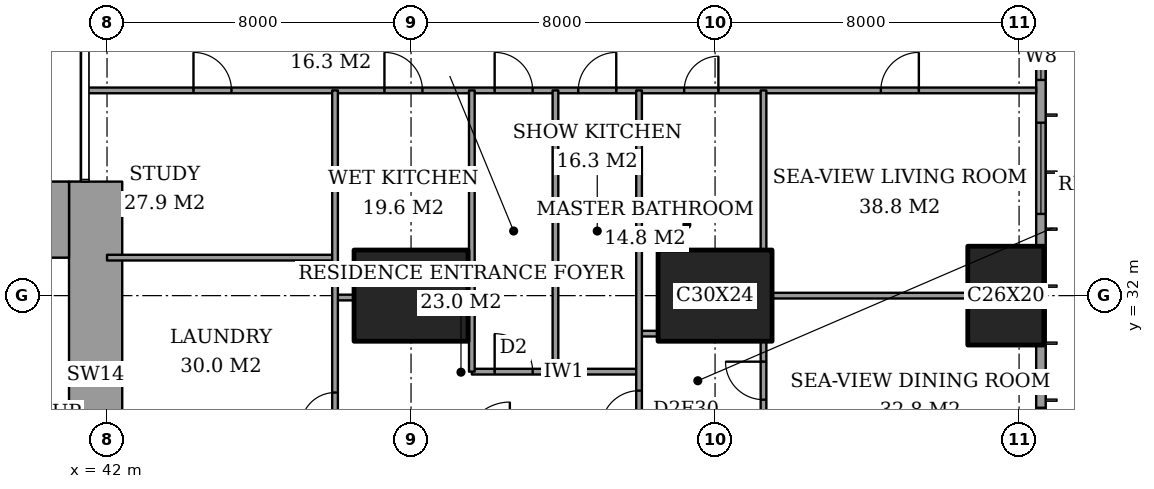
"""IFC4 building model, lengths in metres.
Left out: names, types, materials, properties, quantities, classifications, styles, units other than length and angle.
Written with IfcOpenShell. Run it as: python <this file> out.ifc"""

import sys

from ifc_helpers import new_model, si_unit, direction, frame, frame_2d, origin, origin_2d, place, context, subcontext, project, spatial, rectangle, extrude, element, fill, save


model = new_model("IFC4")
c1 = context("Model", 3, precision=1e-05, world=origin(), true_north=direction((0.0, 1.0)))
c2 = subcontext(c1, "Body", "Model", "MODEL_VIEW")
j1 = project(units=[si_unit("LENGTHUNIT", "METRE"), si_unit("PLANEANGLEUNIT", "RADIAN")], contexts=[c1])
p1 = place(None, origin())
s1 = spatial("IfcSite", under=j1, at=p1, CompositionType="ELEMENT")
p2 = place(p1, origin())
s2 = spatial("IfcBuilding", under=s1, at=p2, CompositionType="ELEMENT")
p3 = place(p2, frame((0.0, 0.0, 44.0)))
s3 = spatial("IfcBuildingStorey", under=s2, at=p3, CompositionType="ELEMENT", Elevation=44.0)
for number, where, z_axis, x_axis in (
    (1, (50.0, 32.0, 0.0), (0.0, 0.0, 1.0), (1.0, 0.0, 0.0)),
    (2, (58.0, 32.0, 0.0), (0.0, 0.0, 1.0), (1.0, 0.0, 0.0)),
):
    element("IfcColumn", number, at=place(p3, frame(where, z_axis=z_axis, x_axis=x_axis)), inside=s3, PredefinedType="COLUMN", context=c2, shape_type="SweptSolid", body=[
        extrude(rectangle(XDim=3.0, YDim=2.4, at=origin_2d()), origin(), (0.0, 0.0, 1.0), 3.6),
    ])
p4 = place(p3, frame((65.65, 32.0, 0.0), z_axis=(0.0, 0.0, 1.0), x_axis=(0.0, 1.0, 0.0)))
e3 = element("IfcColumn", 3, at=p4, inside=s3, PredefinedType="COLUMN", context=c2, shape_type="SweptSolid", body=[
    extrude(rectangle(XDim=2.6, YDim=2.0, at=origin_2d()), origin(), (0.0, 0.0, 1.0), 3.6),
])
p5 = place(p3, frame((37.85, 34.0, 0.0), z_axis=(0.0, 0.0, 1.0), x_axis=(1.0, 0.0, 0.0)))
e4 = element("IfcWall", 4, at=p5, inside=s3, PredefinedType="SHEAR", context=c2, shape_type="SweptSolid", body=[
    extrude(rectangle(XDim=3.15, YDim=2.0, at=frame_2d((1.575, 0.0))), origin(), (0.0, 0.0, 1.0), 3.6),
])
p6 = place(p3, frame((41.7, 24.85, 0.0), z_axis=(0.0, 0.0, 1.0), x_axis=(0.0, 1.0, 0.0)))
e5 = element("IfcWall", 5, at=p6, inside=s3, PredefinedType="SHEAR", context=c2, shape_type="SweptSolid", body=[
    extrude(rectangle(XDim=10.15, YDim=1.4, at=frame_2d((5.075, 0.0))), origin(), (0.0, 0.0, 1.0), 3.6),
])
p7 = place(p3, frame((66.575, 3.175, 0.0), z_axis=(0.0, 0.0, 1.0), x_axis=(0.0, 1.0, 0.0)))
e6 = element("IfcWall", 6, at=p7, inside=s3, PredefinedType="SOLIDWALL", context=c2, shape_type="SweptSolid", body=[
    extrude(rectangle(XDim=41.65, YDim=0.25, at=frame_2d((20.825, 0.0))), origin(), (0.0, 0.0, 1.0), 3.6),
])
p8 = place(p7, frame((0.775, 0.0, 0.6)))
e7 = element("IfcOpeningElement", 7, at=p8, cuts=e6, PredefinedType="OPENING", context=c2, shape_type="SweptSolid", body=[
    extrude(rectangle(XDim=2.4, YDim=2.0, at=frame_2d((1.2, 1.0))), frame((0.0, 0.135, 0.0), z_axis=(0.0, -1.0, 0.0), x_axis=(1.0, 0.0, 0.0)), (0.0, 0.0, 1.0), 0.27),
])
p9 = place(p7, frame((6.1, 0.0, 0.6)))
e8 = element("IfcOpeningElement", 8, at=p9, cuts=e6, PredefinedType="OPENING", context=c2, shape_type="SweptSolid", body=[
    extrude(rectangle(XDim=1.2, YDim=2.0, at=frame_2d((0.6, 1.0))), frame((0.0, 0.135, 0.0), z_axis=(0.0, -1.0, 0.0), x_axis=(1.0, 0.0, 0.0)), (0.0, 0.0, 1.0), 0.27),
])
p10 = place(p7, frame((8.275, 0.0, 0.6)))
e9 = element("IfcOpeningElement", 9, at=p10, cuts=e6, PredefinedType="OPENING", context=c2, shape_type="SweptSolid", body=[
    extrude(rectangle(XDim=2.4, YDim=2.0, at=frame_2d((1.2, 1.0))), frame((0.0, 0.135, 0.0), z_axis=(0.0, -1.0, 0.0), x_axis=(1.0, 0.0, 0.0)), (0.0, 0.0, 1.0), 0.27),
])
p11 = place(p7, frame((15.775, 0.0, 0.6)))
e10 = element("IfcOpeningElement", 10, at=p11, cuts=e6, PredefinedType="OPENING", context=c2, shape_type="SweptSolid", body=[
    extrude(rectangle(XDim=2.4, YDim=2.0, at=frame_2d((1.2, 1.0))), frame((0.0, 0.135, 0.0), z_axis=(0.0, -1.0, 0.0), x_axis=(1.0, 0.0, 0.0)), (0.0, 0.0, 1.0), 0.27),
])
p12 = place(p7, frame((23.475, 0.0, 0.6)))
e11 = element("IfcOpeningElement", 11, at=p12, cuts=e6, PredefinedType="OPENING", context=c2, shape_type="SweptSolid", body=[
    extrude(rectangle(XDim=2.4, YDim=2.0, at=frame_2d((1.2, 1.0))), frame((0.0, 0.135, 0.0), z_axis=(0.0, -1.0, 0.0), x_axis=(1.0, 0.0, 0.0)), (0.0, 0.0, 1.0), 0.27),
])
p13 = place(p7, frame((30.975, 0.0, 0.6)))
e12 = element("IfcOpeningElement", 12, at=p13, cuts=e6, PredefinedType="OPENING", context=c2, shape_type="SweptSolid", body=[
    extrude(rectangle(XDim=2.4, YDim=2.0, at=frame_2d((1.2, 1.0))), frame((0.0, 0.135, 0.0), z_axis=(0.0, -1.0, 0.0), x_axis=(1.0, 0.0, 0.0)), (0.0, 0.0, 1.0), 0.27),
])
p14 = place(p7, frame((34.5, 0.0, 0.6)))
e13 = element("IfcOpeningElement", 13, at=p14, cuts=e6, PredefinedType="OPENING", context=c2, shape_type="SweptSolid", body=[
    extrude(rectangle(XDim=1.2, YDim=2.0, at=frame_2d((0.6, 1.0))), frame((0.0, 0.135, 0.0), z_axis=(0.0, -1.0, 0.0), x_axis=(1.0, 0.0, 0.0)), (0.0, 0.0, 1.0), 0.27),
])
p15 = place(p7, frame((38.475, 0.0, 0.6)))
e14 = element("IfcOpeningElement", 14, at=p15, cuts=e6, PredefinedType="OPENING", context=c2, shape_type="SweptSolid", body=[
    extrude(rectangle(XDim=2.4, YDim=2.0, at=frame_2d((1.2, 1.0))), frame((0.0, 0.135, 0.0), z_axis=(0.0, -1.0, 0.0), x_axis=(1.0, 0.0, 0.0)), (0.0, 0.0, 1.0), 0.27),
])
p16 = place(p3, frame((51.6, 30.0, 0.0), z_axis=(0.0, 0.0, 1.0), x_axis=(1.0, 0.0, 0.0)))
e15 = element("IfcWall", 15, at=p16, inside=s3, PredefinedType="PARTITIONING", context=c2, shape_type="SweptSolid", body=[
    extrude(rectangle(XDim=4.4, YDim=0.15, at=frame_2d((2.2, 0.0))), origin(), (0.0, 0.0, 1.0), 3.35),
])
p17 = place(p16, frame((0.6, 0.0, 0.0)))
e16 = element("IfcOpeningElement", 16, at=p17, cuts=e15, PredefinedType="OPENING", context=c2, shape_type="SweptSolid", body=[
    extrude(rectangle(XDim=1.0, YDim=2.1, at=frame_2d((0.5, 1.05))), frame((0.0, 0.085, 0.0), z_axis=(0.0, -1.0, 0.0), x_axis=(1.0, 0.0, 0.0)), (0.0, 0.0, 1.0), 0.17),
])
p18 = place(p3, frame((56.0, 31.0, 0.0), z_axis=(0.0, 0.0, 1.0), x_axis=(1.0, 0.0, 0.0)))
e17 = element("IfcWall", 17, at=p18, inside=s3, PredefinedType="PARTITIONING", context=c2, shape_type="SweptSolid", body=[
    extrude(rectangle(XDim=0.5, YDim=0.15, at=frame_2d((0.25, 0.0))), origin(), (0.0, 0.0, 1.0), 3.35),
])
p19 = place(p3, frame((48.0, 31.95, 0.0), z_axis=(0.0, 0.0, 1.0), x_axis=(1.0, 0.0, 0.0)))
e18 = element("IfcWall", 18, at=p19, inside=s3, PredefinedType="PARTITIONING", context=c2, shape_type="SweptSolid", body=[
    extrude(rectangle(XDim=0.5, YDim=0.15, at=frame_2d((0.25, 0.0))), origin(), (0.0, 0.0, 1.0), 2.634),
])
p20 = place(p3, frame((59.5, 32.0, 0.0), z_axis=(0.0, 0.0, 1.0), x_axis=(1.0, 0.0, 0.0)))
e19 = element("IfcWall", 19, at=p20, inside=s3, PredefinedType="PARTITIONING", context=c2, shape_type="SweptSolid", body=[
    extrude(rectangle(XDim=5.15, YDim=0.15, at=frame_2d((2.575, 0.0))), origin(), (0.0, 0.0, 1.0), 2.634),
])
p21 = place(p3, frame((42.0, 33.0, 0.0), z_axis=(0.0, 0.0, 1.0), x_axis=(1.0, 0.0, 0.0)))
e20 = element("IfcWall", 20, at=p21, inside=s3, PredefinedType="PARTITIONING", context=c2, shape_type="SweptSolid", body=[
    extrude(rectangle(XDim=6.0, YDim=0.15, at=frame_2d((3.0, 0.0))), origin(), (0.0, 0.0, 1.0), 3.35),
])
p22 = place(p3, frame((41.439, 37.4, 0.0), z_axis=(0.0, 0.0, 1.0), x_axis=(1.0, 0.0, 0.0)))
e21 = element("IfcWall", 21, at=p22, inside=s3, PredefinedType="PARTITIONING", context=c2, shape_type="SweptSolid", body=[
    extrude(rectangle(XDim=25.011, YDim=0.15, at=frame_2d((12.505, 0.0))), origin(), (0.0, 0.0, 1.0), 3.35),
])
p23 = place(p22, frame((10.761, 0.0, 0.0)))
e22 = element("IfcOpeningElement", 22, at=p23, cuts=e21, PredefinedType="OPENING", context=c2, shape_type="SweptSolid", body=[
    extrude(rectangle(XDim=1.0, YDim=2.1, at=frame_2d((0.5, 1.05))), frame((0.0, 0.085, 0.0), z_axis=(0.0, -1.0, 0.0), x_axis=(1.0, 0.0, 0.0)), (0.0, 0.0, 1.0), 0.17),
])
p24 = place(p22, frame((20.924, 0.0, 0.0)))
e23 = element("IfcOpeningElement", 23, at=p24, cuts=e21, PredefinedType="OPENING", context=c2, shape_type="SweptSolid", body=[
    extrude(rectangle(XDim=1.0, YDim=2.1, at=frame_2d((0.5, 1.05))), frame((0.0, 0.085, 0.0), z_axis=(0.0, -1.0, 0.0), x_axis=(1.0, 0.0, 0.0)), (0.0, 0.0, 1.0), 0.17),
])
p25 = place(p22, frame((15.749, 0.0, 0.0)))
e24 = element("IfcOpeningElement", 24, at=p25, cuts=e21, PredefinedType="OPENING", context=c2, shape_type="SweptSolid", body=[
    extrude(rectangle(XDim=0.9, YDim=2.1, at=frame_2d((0.45, 1.05))), frame((0.0, 0.085, 0.0), z_axis=(0.0, -1.0, 0.0), x_axis=(1.0, 0.0, 0.0)), (0.0, 0.0, 1.0), 0.17),
])
p26 = place(p22, frame((12.961, 0.0, 0.0)))
e25 = element("IfcOpeningElement", 25, at=p26, cuts=e21, PredefinedType="OPENING", context=c2, shape_type="SweptSolid", body=[
    extrude(rectangle(XDim=1.0, YDim=2.1, at=frame_2d((0.5, 1.05))), frame((0.0, 0.085, 0.0), z_axis=(0.0, -1.0, 0.0), x_axis=(1.0, 0.0, 0.0)), (0.0, 0.0, 1.0), 0.17),
])
p27 = place(p22, frame((7.861, 0.0, 0.0)))
e26 = element("IfcOpeningElement", 26, at=p27, cuts=e21, PredefinedType="OPENING", context=c2, shape_type="SweptSolid", body=[
    extrude(rectangle(XDim=1.0, YDim=2.1, at=frame_2d((0.5, 1.05))), frame((0.0, 0.085, 0.0), z_axis=(0.0, -1.0, 0.0), x_axis=(1.0, 0.0, 0.0)), (0.0, 0.0, 1.0), 0.17),
])
p28 = place(p22, frame((2.836, 0.0, 0.0)))
e27 = element("IfcOpeningElement", 27, at=p28, cuts=e21, PredefinedType="OPENING", context=c2, shape_type="SweptSolid", body=[
    extrude(rectangle(XDim=1.0, YDim=2.1, at=frame_2d((0.5, 1.05))), frame((0.0, 0.085, 0.0), z_axis=(0.0, -1.0, 0.0), x_axis=(1.0, 0.0, 0.0)), (0.0, 0.0, 1.0), 0.17),
])
p29 = place(p3, frame((48.0, 28.0, 0.0), z_axis=(0.0, 0.0, 1.0), x_axis=(0.0, 1.0, 0.0)))
e28 = element("IfcWall", 28, at=p29, inside=s3, PredefinedType="PARTITIONING", context=c2, shape_type="SweptSolid", body=[
    extrude(rectangle(XDim=9.4, YDim=0.15, at=frame_2d((4.7, 0.0))), origin(), (0.0, 0.0, 1.0), 3.35),
])
p30 = place(p29, frame((0.55, 0.0, 0.0)))
e29 = element("IfcOpeningElement", 29, at=p30, cuts=e28, PredefinedType="OPENING", context=c2, shape_type="SweptSolid", body=[
    extrude(rectangle(XDim=0.9, YDim=2.1, at=frame_2d((0.45, 1.05))), frame((0.0, 0.085, 0.0), z_axis=(0.0, -1.0, 0.0), x_axis=(1.0, 0.0, 0.0)), (0.0, 0.0, 1.0), 0.17),
])
for number, where, z_axis, x_axis in (
    (30, (51.6, 30.0, 0.0), (0.0, 0.0, 1.0), (0.0, 1.0, 0.0)),
    (31, (53.8, 30.0, 0.0), (0.0, 0.0, 1.0), (0.0, 1.0, 0.0)),
):
    element("IfcWall", number, at=place(p3, frame(where, z_axis=z_axis, x_axis=x_axis)), inside=s3, PredefinedType="PARTITIONING", context=c2, shape_type="SweptSolid", body=[
        extrude(rectangle(XDim=7.4, YDim=0.15, at=frame_2d((3.7, 0.0))), origin(), (0.0, 0.0, 1.0), 3.35),
    ])
p31 = place(p3, frame((56.0, 28.0, 0.0), z_axis=(0.0, 0.0, 1.0), x_axis=(0.0, 1.0, 0.0)))
e32 = element("IfcWall", 32, at=p31, inside=s3, PredefinedType="PARTITIONING", context=c2, shape_type="SweptSolid", body=[
    extrude(rectangle(XDim=9.4, YDim=0.15, at=frame_2d((4.7, 0.0))), origin(), (0.0, 0.0, 1.0), 3.35),
])
p32 = place(p31, frame((0.5, 0.0, 0.0)))
e33 = element("IfcOpeningElement", 33, at=p32, cuts=e32, PredefinedType="OPENING", context=c2, shape_type="SweptSolid", body=[
    extrude(rectangle(XDim=1.0, YDim=2.1, at=frame_2d((0.5, 1.05))), frame((0.0, 0.085, 0.0), z_axis=(0.0, -1.0, 0.0), x_axis=(1.0, 0.0, 0.0)), (0.0, 0.0, 1.0), 0.17),
])
p33 = place(p3, frame((59.275, 28.35, 0.0), z_axis=(0.0, 0.0, 1.0), x_axis=(0.0, 1.0, 0.0)))
e34 = element("IfcWall", 34, at=p33, inside=s3, PredefinedType="PARTITIONING", context=c2, shape_type="SweptSolid", body=[
    extrude(rectangle(XDim=2.45, YDim=0.15, at=frame_2d((1.225, 0.0))), origin(), (0.0, 0.0, 1.0), 3.35),
])
p34 = place(p33, frame((0.913, 0.0, 0.0)))
e35 = element("IfcOpeningElement", 35, at=p34, cuts=e34, PredefinedType="OPENING", context=c2, shape_type="SweptSolid", body=[
    extrude(rectangle(XDim=1.0, YDim=2.1, at=frame_2d((0.5, 1.05))), frame((0.0, 0.085, 0.0), z_axis=(0.0, -1.0, 0.0), x_axis=(1.0, 0.0, 0.0)), (0.0, 0.0, 1.0), 0.17),
])
p35 = place(p3, frame((59.275, 33.2, 0.0), z_axis=(0.0, 0.0, 1.0), x_axis=(0.0, 1.0, 0.0)))
e36 = element("IfcWall", 36, at=p35, inside=s3, PredefinedType="PARTITIONING", context=c2, shape_type="SweptSolid", body=[
    extrude(rectangle(XDim=4.2, YDim=0.15, at=frame_2d((2.1, 0.0))), origin(), (0.0, 0.0, 1.0), 3.35),
])
p36 = place(p12, origin())
e37 = element("IfcWindow", 37, at=p36, inside=s3, PartitioningType="SINGLE_PANEL", PredefinedType="WINDOW", context=c2, shape_type="SweptSolid", body=[
    extrude(rectangle(XDim=2.4, YDim=2.0, at=frame_2d((1.2, 1.0))), frame((0.0, 0.03, 0.0), z_axis=(0.0, -1.0, 0.0), x_axis=(1.0, 0.0, 0.0)), (0.0, 0.0, 1.0), 0.06),
])
fill(e11, e37)
p37 = place(p13, origin())
e38 = element("IfcWindow", 38, at=p37, inside=s3, PartitioningType="SINGLE_PANEL", PredefinedType="WINDOW", context=c2, shape_type="SweptSolid", body=[
    extrude(rectangle(XDim=2.4, YDim=2.0, at=frame_2d((1.2, 1.0))), frame((0.0, 0.03, 0.0), z_axis=(0.0, -1.0, 0.0), x_axis=(1.0, 0.0, 0.0)), (0.0, 0.0, 1.0), 0.06),
])
fill(e12, e38)
p38 = place(p14, origin())
e39 = element("IfcWindow", 39, at=p38, inside=s3, PartitioningType="SINGLE_PANEL", PredefinedType="WINDOW", context=c2, shape_type="SweptSolid", body=[
    extrude(rectangle(XDim=1.2, YDim=2.0, at=frame_2d((0.6, 1.0))), frame((0.0, 0.03, 0.0), z_axis=(0.0, -1.0, 0.0), x_axis=(1.0, 0.0, 0.0)), (0.0, 0.0, 1.0), 0.06),
])
fill(e13, e39)
p39 = place(p23, origin())
e40 = element("IfcDoor", 40, at=p39, inside=s3, OperationType="SINGLE_SWING_RIGHT", PredefinedType="DOOR", context=c2, shape_type="SweptSolid", body=[
    extrude(rectangle(XDim=1.0, YDim=2.1, at=frame_2d((0.5, 1.05))), frame((0.0, 0.025, 0.0), z_axis=(0.0, -1.0, 0.0), x_axis=(1.0, 0.0, 0.0)), (0.0, 0.0, 1.0), 0.05),
])
fill(e22, e40)
p40 = place(p24, origin())
e41 = element("IfcDoor", 41, at=p40, inside=s3, OperationType="SINGLE_SWING_LEFT", PredefinedType="DOOR", context=c2, shape_type="SweptSolid", body=[
    extrude(rectangle(XDim=1.0, YDim=2.1, at=frame_2d((0.5, 1.05))), frame((0.0, 0.025, 0.0), z_axis=(0.0, -1.0, 0.0), x_axis=(1.0, 0.0, 0.0)), (0.0, 0.0, 1.0), 0.05),
])
fill(e23, e41)
p41 = place(p34, origin())
e42 = element("IfcDoor", 42, at=p41, inside=s3, OperationType="SINGLE_SWING_LEFT", PredefinedType="DOOR", context=c2, shape_type="SweptSolid", body=[
    extrude(rectangle(XDim=1.0, YDim=2.1, at=frame_2d((0.5, 1.05))), frame((0.0, 0.025, 0.0), z_axis=(0.0, -1.0, 0.0), x_axis=(1.0, 0.0, 0.0)), (0.0, 0.0, 1.0), 0.05),
])
fill(e35, e42)
p42 = place(p25, origin())
e43 = element("IfcDoor", 43, at=p42, inside=s3, OperationType="SINGLE_SWING_LEFT", PredefinedType="DOOR", context=c2, shape_type="SweptSolid", body=[
    extrude(rectangle(XDim=0.9, YDim=2.1, at=frame_2d((0.45, 1.05))), frame((0.0, 0.025, 0.0), z_axis=(0.0, -1.0, 0.0), x_axis=(1.0, 0.0, 0.0)), (0.0, 0.0, 1.0), 0.05),
])
fill(e24, e43)
p43 = place(p32, origin())
e44 = element("IfcDoor", 44, at=p43, inside=s3, OperationType="SINGLE_SWING_RIGHT", PredefinedType="DOOR", context=c2, shape_type="SweptSolid", body=[
    extrude(rectangle(XDim=1.0, YDim=2.1, at=frame_2d((0.5, 1.05))), frame((0.0, 0.025, 0.0), z_axis=(0.0, -1.0, 0.0), x_axis=(1.0, 0.0, 0.0)), (0.0, 0.0, 1.0), 0.05),
])
fill(e33, e44)
p44 = place(p26, origin())
e45 = element("IfcDoor", 45, at=p44, inside=s3, OperationType="SINGLE_SWING_LEFT", PredefinedType="DOOR", context=c2, shape_type="SweptSolid", body=[
    extrude(rectangle(XDim=1.0, YDim=2.1, at=frame_2d((0.5, 1.05))), frame((0.0, 0.025, 0.0), z_axis=(0.0, -1.0, 0.0), x_axis=(1.0, 0.0, 0.0)), (0.0, 0.0, 1.0), 0.05),
])
fill(e25, e45)
p45 = place(p17, origin())
e46 = element("IfcDoor", 46, at=p45, inside=s3, OperationType="SINGLE_SWING_RIGHT", PredefinedType="DOOR", context=c2, shape_type="SweptSolid", body=[
    extrude(rectangle(XDim=1.0, YDim=2.1, at=frame_2d((0.5, 1.05))), frame((0.0, 0.025, 0.0), z_axis=(0.0, -1.0, 0.0), x_axis=(1.0, 0.0, 0.0)), (0.0, 0.0, 1.0), 0.05),
])
fill(e16, e46)
p46 = place(p27, origin())
e47 = element("IfcDoor", 47, at=p46, inside=s3, OperationType="SINGLE_SWING_RIGHT", PredefinedType="DOOR", context=c2, shape_type="SweptSolid", body=[
    extrude(rectangle(XDim=1.0, YDim=2.1, at=frame_2d((0.5, 1.05))), frame((0.0, 0.025, 0.0), z_axis=(0.0, -1.0, 0.0), x_axis=(1.0, 0.0, 0.0)), (0.0, 0.0, 1.0), 0.05),
])
fill(e26, e47)
p47 = place(p28, origin())
e48 = element("IfcDoor", 48, at=p47, inside=s3, OperationType="SINGLE_SWING_RIGHT", PredefinedType="DOOR", context=c2, shape_type="SweptSolid", body=[
    extrude(rectangle(XDim=1.0, YDim=2.1, at=frame_2d((0.5, 1.05))), frame((0.0, 0.025, 0.0), z_axis=(0.0, -1.0, 0.0), x_axis=(1.0, 0.0, 0.0)), (0.0, 0.0, 1.0), 0.05),
])
fill(e27, e48)
p48 = place(p30, origin())
e49 = element("IfcDoor", 49, at=p48, inside=s3, OperationType="SINGLE_SWING_RIGHT", PredefinedType="DOOR", context=c2, shape_type="SweptSolid", body=[
    extrude(rectangle(XDim=0.9, YDim=2.1, at=frame_2d((0.45, 1.05))), frame((0.0, 0.025, 0.0), z_axis=(0.0, -1.0, 0.0), x_axis=(1.0, 0.0, 0.0)), (0.0, 0.0, 1.0), 0.05),
])
fill(e29, e49)
save(model, sys.argv[1])
